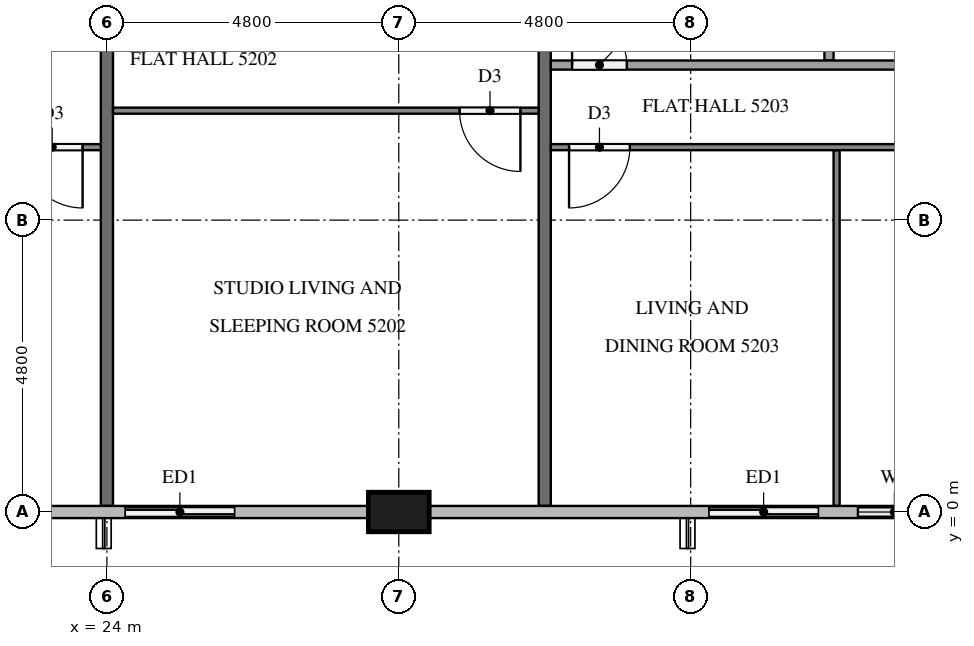
"""IFC4 building model, lengths in metres.
Left out: names, types, materials, properties, quantities, classifications, styles, units other than length and angle.
Written with IfcOpenShell. Run it as: python <this file> out.ifc"""

import sys

from ifc_helpers import new_model, si_unit, direction, frame, frame_2d, origin, origin_2d, place, context, subcontext, project, spatial, rectangle, extrude, element, fill, save


model = new_model("IFC4")
c1 = context("Model", 3, precision=1e-05, world=origin(), true_north=direction((0.0, 1.0)))
c2 = subcontext(c1, "Body", "Model", "MODEL_VIEW")
j1 = project(units=[si_unit("LENGTHUNIT", "METRE"), si_unit("PLANEANGLEUNIT", "RADIAN")], contexts=[c1])
p1 = place(None, origin())
s1 = spatial("IfcSite", under=j1, at=p1, CompositionType="ELEMENT")
p2 = place(p1, origin())
s2 = spatial("IfcBuilding", under=s1, at=p2, CompositionType="ELEMENT")
p3 = place(p2, frame((0.0, 0.0, 199.9)))
s3 = spatial("IfcBuildingStorey", under=s2, at=p3, CompositionType="ELEMENT", Elevation=199.9)
p4 = place(p3, frame((28.8, 0.0, 0.0), z_axis=(0.0, 0.0, 1.0), x_axis=(1.0, 0.0, 0.0)))
e1 = element("IfcColumn", 1, at=p4, inside=s3, PredefinedType="COLUMN", context=c2, shape_type="SweptSolid", body=[
    extrude(rectangle(XDim=1.0, YDim=0.65, at=origin_2d()), origin(), (0.0, 0.0, 1.0), 3.1),
])
p5 = place(p3, frame((24.0, 0.0, 0.0), z_axis=(0.0, 0.0, 1.0), x_axis=(1.0, 0.0, 0.0)))
e2 = element("IfcWall", 2, at=p5, inside=s3, PredefinedType="SOLIDWALL", context=c2, shape_type="SweptSolid", body=[
    extrude(rectangle(XDim=2.4, YDim=0.15, at=frame_2d((1.2, 0.0))), origin(), (0.0, 0.0, 1.0), 3.1),
])
p6 = place(p5, frame((0.3, 0.0, 0.0)))
e3 = element("IfcOpeningElement", 3, at=p6, cuts=e2, PredefinedType="OPENING", context=c2, shape_type="SweptSolid", body=[
    extrude(rectangle(XDim=1.8, YDim=2.4, at=frame_2d((0.9, 1.2))), frame((0.0, 0.085, 0.0), z_axis=(0.0, -1.0, 0.0), x_axis=(1.0, 0.0, 0.0)), (0.0, 0.0, 1.0), 0.17),
])
p7 = place(p3, frame((33.6, 0.0, 0.0), z_axis=(0.0, 0.0, 1.0), x_axis=(1.0, 0.0, 0.0)))
e4 = element("IfcWall", 4, at=p7, inside=s3, PredefinedType="SOLIDWALL", context=c2, shape_type="SweptSolid", body=[
    extrude(rectangle(XDim=4.3, YDim=0.15, at=frame_2d((2.15, 0.0))), origin(), (0.0, 0.0, 1.0), 3.1),
])
p8 = place(p7, frame((0.3, 0.0, 0.0)))
e5 = element("IfcOpeningElement", 5, at=p8, cuts=e4, PredefinedType="OPENING", context=c2, shape_type="SweptSolid", body=[
    extrude(rectangle(XDim=1.8, YDim=2.4, at=frame_2d((0.9, 1.2))), frame((0.0, 0.085, 0.0), z_axis=(0.0, -1.0, 0.0), x_axis=(1.0, 0.0, 0.0)), (0.0, 0.0, 1.0), 0.17),
])
p9 = place(p7, frame((2.75, 0.0, 0.9)))
e6 = element("IfcOpeningElement", 6, at=p9, cuts=e4, PredefinedType="OPENING", context=c2, shape_type="SweptSolid", body=[
    extrude(rectangle(XDim=1.2, YDim=1.4, at=frame_2d((0.6, 0.7))), frame((0.0, 0.085, 0.0), z_axis=(0.0, -1.0, 0.0), x_axis=(1.0, 0.0, 0.0)), (0.0, 0.0, 1.0), 0.17),
])
for number, where, z_axis, x_axis in (
    (7, (24.0, 11.9, 0.0), (0.0, 0.0, 1.0), (0.0, -1.0, 0.0)),
    (8, (31.2, 11.9, 0.0), (0.0, 0.0, 1.0), (0.0, -1.0, 0.0)),
):
    element("IfcWall", number, at=place(p3, frame(where, z_axis=z_axis, x_axis=x_axis)), inside=s3, PredefinedType="PARTITIONING", context=c2, shape_type="SweptSolid", body=[
        extrude(rectangle(XDim=11.8, YDim=0.2, at=frame_2d((5.9, 0.0))), origin(), (0.0, 0.0, 1.0), 3.1),
    ])
p10 = place(p3, frame((23.9, 6.0, 0.0), z_axis=(0.0, 0.0, 1.0), x_axis=(-1.0, 0.0, 0.0)))
e9 = element("IfcWall", 9, at=p10, inside=s3, PredefinedType="PARTITIONING", context=c2, shape_type="SweptSolid", body=[
    extrude(rectangle(XDim=19.0, YDim=0.1, at=frame_2d((9.5, 0.0))), origin(), (0.0, 0.0, 1.0), 3.1),
])
p11 = place(p10, frame((0.3, 0.0, 0.0)))
e10 = element("IfcOpeningElement", 10, at=p11, cuts=e9, PredefinedType="OPENING", context=c2, shape_type="SweptSolid", body=[
    extrude(rectangle(XDim=1.0, YDim=2.1, at=frame_2d((0.5, 1.05))), frame((0.0, 0.06, 0.0), z_axis=(0.0, -1.0, 0.0), x_axis=(1.0, 0.0, 0.0)), (0.0, 0.0, 1.0), 0.12),
])
p12 = place(p10, frame((8.25, 0.0, 0.0)))
e11 = element("IfcOpeningElement", 11, at=p12, cuts=e9, PredefinedType="OPENING", context=c2, shape_type="SweptSolid", body=[
    extrude(rectangle(XDim=0.9, YDim=2.1, at=frame_2d((0.45, 1.05))), frame((0.0, 0.06, 0.0), z_axis=(0.0, -1.0, 0.0), x_axis=(1.0, 0.0, 0.0)), (0.0, 0.0, 1.0), 0.12),
])
p13 = place(p10, frame((9.85, 0.0, 0.0)))
e12 = element("IfcOpeningElement", 12, at=p13, cuts=e9, PredefinedType="OPENING", context=c2, shape_type="SweptSolid", body=[
    extrude(rectangle(XDim=0.9, YDim=2.1, at=frame_2d((0.45, 1.05))), frame((0.0, 0.06, 0.0), z_axis=(0.0, -1.0, 0.0), x_axis=(1.0, 0.0, 0.0)), (0.0, 0.0, 1.0), 0.12),
])
p14 = place(p10, frame((17.7, 0.0, 0.0)))
e13 = element("IfcOpeningElement", 13, at=p14, cuts=e9, PredefinedType="OPENING", context=c2, shape_type="SweptSolid", body=[
    extrude(rectangle(XDim=0.9, YDim=2.1, at=frame_2d((0.45, 1.05))), frame((0.0, 0.06, 0.0), z_axis=(0.0, -1.0, 0.0), x_axis=(1.0, 0.0, 0.0)), (0.0, 0.0, 1.0), 0.12),
])
p15 = place(p3, frame((31.1, 6.6, 0.0), z_axis=(0.0, 0.0, 1.0), x_axis=(-1.0, 0.0, 0.0)))
e14 = element("IfcWall", 14, at=p15, inside=s3, PredefinedType="PARTITIONING", context=c2, shape_type="SweptSolid", body=[
    extrude(rectangle(XDim=7.0, YDim=0.1, at=frame_2d((3.5, 0.0))), origin(), (0.0, 0.0, 1.0), 3.1),
])
p16 = place(p15, frame((0.3, 0.0, 0.0)))
e15 = element("IfcOpeningElement", 15, at=p16, cuts=e14, PredefinedType="OPENING", context=c2, shape_type="SweptSolid", body=[
    extrude(rectangle(XDim=1.0, YDim=2.1, at=frame_2d((0.5, 1.05))), frame((0.0, 0.06, 0.0), z_axis=(0.0, -1.0, 0.0), x_axis=(1.0, 0.0, 0.0)), (0.0, 0.0, 1.0), 0.12),
])
p17 = place(p3, frame((36.0, 5.95, 0.0), z_axis=(0.0, 0.0, 1.0), x_axis=(0.0, -1.0, 0.0)))
e16 = element("IfcWall", 16, at=p17, inside=s3, PredefinedType="PARTITIONING", context=c2, shape_type="SweptSolid", body=[
    extrude(rectangle(XDim=5.85, YDim=0.1, at=frame_2d((2.925, 0.0))), origin(), (0.0, 0.0, 1.0), 3.1),
])
p18 = place(p3, frame((40.7, 6.0, 0.0), z_axis=(0.0, 0.0, 1.0), x_axis=(-1.0, 0.0, 0.0)))
e17 = element("IfcWall", 17, at=p18, inside=s3, PredefinedType="PARTITIONING", context=c2, shape_type="SweptSolid", body=[
    extrude(rectangle(XDim=9.4, YDim=0.1, at=frame_2d((4.7, 0.0))), origin(), (0.0, 0.0, 1.0), 3.1),
])
p19 = place(p18, frame((0.3, 0.0, 0.0)))
e18 = element("IfcOpeningElement", 18, at=p19, cuts=e17, PredefinedType="OPENING", context=c2, shape_type="SweptSolid", body=[
    extrude(rectangle(XDim=0.9, YDim=2.1, at=frame_2d((0.45, 1.05))), frame((0.0, 0.06, 0.0), z_axis=(0.0, -1.0, 0.0), x_axis=(1.0, 0.0, 0.0)), (0.0, 0.0, 1.0), 0.12),
])
p20 = place(p18, frame((8.1, 0.0, 0.0)))
e19 = element("IfcOpeningElement", 19, at=p20, cuts=e17, PredefinedType="OPENING", context=c2, shape_type="SweptSolid", body=[
    extrude(rectangle(XDim=1.0, YDim=2.1, at=frame_2d((0.5, 1.05))), frame((0.0, 0.06, 0.0), z_axis=(0.0, -1.0, 0.0), x_axis=(1.0, 0.0, 0.0)), (0.0, 0.0, 1.0), 0.12),
])
p21 = place(p3, frame((35.875, 11.9, 0.0), z_axis=(0.0, 0.0, 1.0), x_axis=(0.0, -1.0, 0.0)))
e20 = element("IfcWall", 20, at=p21, inside=s3, PredefinedType="PARTITIONING", context=c2, shape_type="SweptSolid", body=[
    extrude(rectangle(XDim=4.475, YDim=0.15, at=frame_2d((2.237, 0.0))), origin(), (0.0, 0.0, 1.0), 3.1),
])
p22 = place(p3, frame((31.3, 7.35, 0.0), z_axis=(0.0, 0.0, 1.0), x_axis=(1.0, 0.0, 0.0)))
e21 = element("IfcWall", 21, at=p22, inside=s3, PredefinedType="PARTITIONING", context=c2, shape_type="SweptSolid", body=[
    extrude(rectangle(XDim=7.625, YDim=0.15, at=frame_2d((3.812, 0.0))), origin(), (0.0, 0.0, 1.0), 3.1),
])
p23 = place(p22, frame((6.525, 0.0, 0.0)))
e22 = element("IfcOpeningElement", 22, at=p23, cuts=e21, PredefinedType="OPENING", context=c2, shape_type="SweptSolid", body=[
    extrude(rectangle(XDim=0.8, YDim=2.1, at=frame_2d((0.4, 1.05))), frame((0.0, 0.085, 0.0), z_axis=(0.0, -1.0, 0.0), x_axis=(1.0, 0.0, 0.0)), (0.0, 0.0, 1.0), 0.17),
])
p24 = place(p22, frame((0.35, 0.0, 0.0)))
e23 = element("IfcOpeningElement", 23, at=p24, cuts=e21, PredefinedType="OPENING", context=c2, shape_type="SweptSolid", body=[
    extrude(rectangle(XDim=0.9, YDim=2.1, at=frame_2d((0.45, 1.05))), frame((0.0, 0.085, 0.0), z_axis=(0.0, -1.0, 0.0), x_axis=(1.0, 0.0, 0.0)), (0.0, 0.0, 1.0), 0.17),
])
p25 = place(p6, origin())
e24 = element("IfcDoor", 24, at=p25, inside=s3, OperationType="SLIDING_TO_LEFT", PredefinedType="DOOR", context=c2, shape_type="SweptSolid", body=[
    extrude(rectangle(XDim=1.8, YDim=2.4, at=frame_2d((0.9, 1.2))), frame((0.0, 0.025, 0.0), z_axis=(0.0, -1.0, 0.0), x_axis=(1.0, 0.0, 0.0)), (0.0, 0.0, 1.0), 0.05),
])
fill(e3, e24)
p26 = place(p8, origin())
e25 = element("IfcDoor", 25, at=p26, inside=s3, OperationType="SLIDING_TO_RIGHT", PredefinedType="DOOR", context=c2, shape_type="SweptSolid", body=[
    extrude(rectangle(XDim=1.8, YDim=2.4, at=frame_2d((0.9, 1.2))), frame((0.0, 0.025, 0.0), z_axis=(0.0, -1.0, 0.0), x_axis=(1.0, 0.0, 0.0)), (0.0, 0.0, 1.0), 0.05),
])
fill(e5, e25)
p27 = place(p9, origin())
e26 = element("IfcWindow", 26, at=p27, inside=s3, PartitioningType="SINGLE_PANEL", PredefinedType="WINDOW", context=c2, shape_type="SweptSolid", body=[
    extrude(rectangle(XDim=1.2, YDim=1.4, at=frame_2d((0.6, 0.7))), frame((0.0, 0.03, 0.0), z_axis=(0.0, -1.0, 0.0), x_axis=(1.0, 0.0, 0.0)), (0.0, 0.0, 1.0), 0.06),
])
fill(e6, e26)
p28 = place(p11, origin())
e27 = element("IfcDoor", 27, at=p28, inside=s3, OperationType="SINGLE_SWING_LEFT", PredefinedType="DOOR", context=c2, shape_type="SweptSolid", body=[
    extrude(rectangle(XDim=1.0, YDim=2.1, at=frame_2d((0.5, 1.05))), frame((0.0, 0.025, 0.0), z_axis=(0.0, -1.0, 0.0), x_axis=(1.0, 0.0, 0.0)), (0.0, 0.0, 1.0), 0.05),
])
fill(e10, e27)
p29 = place(p16, origin())
e28 = element("IfcDoor", 28, at=p29, inside=s3, OperationType="SINGLE_SWING_LEFT", PredefinedType="DOOR", context=c2, shape_type="SweptSolid", body=[
    extrude(rectangle(XDim=1.0, YDim=2.1, at=frame_2d((0.5, 1.05))), frame((0.0, 0.025, 0.0), z_axis=(0.0, -1.0, 0.0), x_axis=(1.0, 0.0, 0.0)), (0.0, 0.0, 1.0), 0.05),
])
fill(e15, e28)
p30 = place(p20, origin())
e29 = element("IfcDoor", 29, at=p30, inside=s3, OperationType="SINGLE_SWING_RIGHT", PredefinedType="DOOR", context=c2, shape_type="SweptSolid", body=[
    extrude(rectangle(XDim=1.0, YDim=2.1, at=frame_2d((0.5, 1.05))), frame((0.0, 0.025, 0.0), z_axis=(0.0, -1.0, 0.0), x_axis=(1.0, 0.0, 0.0)), (0.0, 0.0, 1.0), 0.05),
])
fill(e19, e29)
p31 = place(p24, origin())
e30 = element("IfcDoor", 30, at=p31, inside=s3, OperationType="SINGLE_SWING_LEFT", PredefinedType="DOOR", context=c2, shape_type="SweptSolid", body=[
    extrude(rectangle(XDim=0.9, YDim=2.1, at=frame_2d((0.45, 1.05))), frame((0.0, 0.025, 0.0), z_axis=(0.0, -1.0, 0.0), x_axis=(1.0, 0.0, 0.0)), (0.0, 0.0, 1.0), 0.05),
])
fill(e23, e30)
save(model, sys.argv[1])
